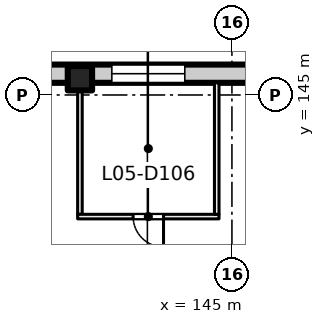
"""IFC4 building model, lengths in metres.
Left out: names, types, materials, properties, quantities, classifications, styles, units other than length and angle.
Written with IfcOpenShell. Run it as: python <this file> out.ifc"""

import sys

from ifc_helpers import new_model, si_unit, direction, frame, frame_2d, origin, origin_2d, place, context, subcontext, project, spatial, rectangle, extrude, element, fill, save


model = new_model("IFC4")
c1 = context("Model", 3, precision=1e-05, world=origin(), true_north=direction((0.0, 1.0)))
c2 = subcontext(c1, "Body", "Model", "MODEL_VIEW")
j1 = project(units=[si_unit("LENGTHUNIT", "METRE"), si_unit("PLANEANGLEUNIT", "RADIAN")], contexts=[c1])
p1 = place(None, origin())
s1 = spatial("IfcSite", under=j1, at=p1, CompositionType="ELEMENT")
p2 = place(p1, origin())
s2 = spatial("IfcBuilding", under=s1, at=p2, CompositionType="ELEMENT")
p3 = place(p2, frame((0.0, 0.0, 27.5)))
s3 = spatial("IfcBuildingStorey", under=s2, at=p3, CompositionType="ELEMENT", Elevation=27.5)
p4 = place(p3, frame((140.0, 145.55, 0.0), z_axis=(0.0, 0.0, 1.0), x_axis=(1.0, 0.0, 0.0)))
e1 = element("IfcColumn", 1, at=p4, inside=s3, PredefinedType="COLUMN", context=c2, shape_type="SweptSolid", body=[
    extrude(rectangle(XDim=0.8, YDim=0.8, at=origin_2d()), origin(), (0.0, 0.0, 1.0), 4.0),
])
p5 = place(p3, frame((131.07, 145.7, 0.0), z_axis=(0.0, 0.0, 1.0), x_axis=(1.0, 0.0, 0.0)))
e2 = element("IfcWall", 2, at=p5, inside=s3, PredefinedType="SOLIDWALL", context=c2, shape_type="SweptSolid", body=[
    extrude(rectangle(XDim=31.93, YDim=0.6, at=frame_2d((15.965, 0.0))), origin(), (0.0, 0.0, 1.0), 3.625),
])
p6 = place(p5, frame((1.28, 0.0, 0.0)))
e3 = element("IfcOpeningElement", 3, at=p6, cuts=e2, PredefinedType="OPENING", context=c2, shape_type="SweptSolid", body=[
    extrude(rectangle(XDim=1.8, YDim=2.4, at=frame_2d((0.9, 1.2))), frame((0.0, 0.31, 0.0), z_axis=(0.0, -1.0, 0.0), x_axis=(1.0, 0.0, 0.0)), (0.0, 0.0, 1.0), 0.62),
])
p7 = place(p5, frame((5.48, 0.0, 0.9)))
e4 = element("IfcOpeningElement", 4, at=p7, cuts=e2, PredefinedType="OPENING", context=c2, shape_type="SweptSolid", body=[
    extrude(rectangle(XDim=2.4, YDim=2.4, at=frame_2d((1.2, 1.2))), frame((0.0, 0.31, 0.0), z_axis=(0.0, -1.0, 0.0), x_axis=(1.0, 0.0, 0.0)), (0.0, 0.0, 1.0), 0.62),
])
p8 = place(p5, frame((9.98, 0.0, 0.9)))
e5 = element("IfcOpeningElement", 5, at=p8, cuts=e2, PredefinedType="OPENING", context=c2, shape_type="SweptSolid", body=[
    extrude(rectangle(XDim=2.4, YDim=2.4, at=frame_2d((1.2, 1.2))), frame((0.0, 0.31, 0.0), z_axis=(0.0, -1.0, 0.0), x_axis=(1.0, 0.0, 0.0)), (0.0, 0.0, 1.0), 0.62),
])
p9 = place(p5, frame((14.48, 0.0, 0.9)))
e6 = element("IfcOpeningElement", 6, at=p9, cuts=e2, PredefinedType="OPENING", context=c2, shape_type="SweptSolid", body=[
    extrude(rectangle(XDim=2.4, YDim=2.4, at=frame_2d((1.2, 1.2))), frame((0.0, 0.31, 0.0), z_axis=(0.0, -1.0, 0.0), x_axis=(1.0, 0.0, 0.0)), (0.0, 0.0, 1.0), 0.62),
])
p10 = place(p5, frame((19.28, 0.0, 0.0)))
e7 = element("IfcOpeningElement", 7, at=p10, cuts=e2, PredefinedType="OPENING", context=c2, shape_type="SweptSolid", body=[
    extrude(rectangle(XDim=1.8, YDim=2.4, at=frame_2d((0.9, 1.2))), frame((0.0, 0.31, 0.0), z_axis=(0.0, -1.0, 0.0), x_axis=(1.0, 0.0, 0.0)), (0.0, 0.0, 1.0), 0.62),
])
p11 = place(p5, frame((23.48, 0.0, 0.9)))
e8 = element("IfcOpeningElement", 8, at=p11, cuts=e2, PredefinedType="OPENING", context=c2, shape_type="SweptSolid", body=[
    extrude(rectangle(XDim=2.4, YDim=2.4, at=frame_2d((1.2, 1.2))), frame((0.0, 0.31, 0.0), z_axis=(0.0, -1.0, 0.0), x_axis=(1.0, 0.0, 0.0)), (0.0, 0.0, 1.0), 0.62),
])
p12 = place(p5, frame((27.98, 0.0, 0.9)))
e9 = element("IfcOpeningElement", 9, at=p12, cuts=e2, PredefinedType="OPENING", context=c2, shape_type="SweptSolid", body=[
    extrude(rectangle(XDim=2.4, YDim=2.4, at=frame_2d((1.2, 1.2))), frame((0.0, 0.31, 0.0), z_axis=(0.0, -1.0, 0.0), x_axis=(1.0, 0.0, 0.0)), (0.0, 0.0, 1.0), 0.62),
])
p13 = place(p3, frame((140.0, 141.075, 0.0), z_axis=(0.0, 0.0, 1.0), x_axis=(0.0, 1.0, 0.0)))
e10 = element("IfcWall", 10, at=p13, inside=s3, PredefinedType="PARTITIONING", context=c2, shape_type="SweptSolid", body=[
    extrude(rectangle(XDim=4.325, YDim=0.15, at=frame_2d((2.163, 0.0))), origin(), (0.0, 0.0, 1.0), 3.625),
])
p14 = place(p3, frame((144.575, 141.0, 0.0), z_axis=(0.0, 0.0, 1.0), x_axis=(-1.0, 0.0, 0.0)))
e11 = element("IfcWall", 11, at=p14, inside=s3, PredefinedType="PARTITIONING", context=c2, shape_type="SweptSolid", body=[
    extrude(rectangle(XDim=4.65, YDim=0.15, at=frame_2d((2.325, 0.0))), origin(), (0.0, 0.0, 1.0), 3.625),
])
p15 = place(p14, frame((1.825, 0.0, 0.0)))
e12 = element("IfcOpeningElement", 12, at=p15, cuts=e11, PredefinedType="OPENING", context=c2, shape_type="SweptSolid", body=[
    extrude(rectangle(XDim=1.0, YDim=2.1, at=frame_2d((0.5, 1.05))), frame((0.0, 0.085, 0.0), z_axis=(0.0, -1.0, 0.0), x_axis=(1.0, 0.0, 0.0)), (0.0, 0.0, 1.0), 0.17),
])
p16 = place(p3, frame((144.5, 145.4, 0.0), z_axis=(0.0, 0.0, 1.0), x_axis=(0.0, -1.0, 0.0)))
e13 = element("IfcWall", 13, at=p16, inside=s3, PredefinedType="PARTITIONING", context=c2, shape_type="SweptSolid", body=[
    extrude(rectangle(XDim=4.325, YDim=0.15, at=frame_2d((2.163, 0.0))), origin(), (0.0, 0.0, 1.0), 3.625),
])
p17 = place(p8, origin())
e14 = element("IfcWindow", 14, at=p17, inside=s3, PartitioningType="SINGLE_PANEL", PredefinedType="WINDOW", context=c2, shape_type="SweptSolid", body=[
    extrude(rectangle(XDim=2.4, YDim=2.4, at=frame_2d((1.2, 1.2))), frame((0.0, 0.03, 0.0), z_axis=(0.0, -1.0, 0.0), x_axis=(1.0, 0.0, 0.0)), (0.0, 0.0, 1.0), 0.06),
])
fill(e5, e14)
p18 = place(p15, origin())
e15 = element("IfcDoor", 15, at=p18, inside=s3, OperationType="SINGLE_SWING_LEFT", PredefinedType="DOOR", context=c2, shape_type="SweptSolid", body=[
    extrude(rectangle(XDim=1.0, YDim=2.1, at=frame_2d((0.5, 1.05))), frame((0.0, 0.025, 0.0), z_axis=(0.0, -1.0, 0.0), x_axis=(1.0, 0.0, 0.0)), (0.0, 0.0, 1.0), 0.05),
])
fill(e12, e15)
save(model, sys.argv[1])
